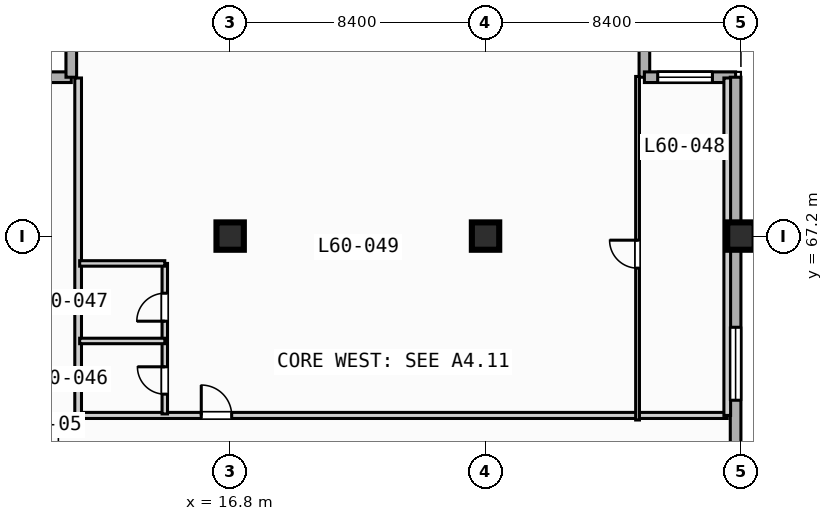
"""IFC4 building model, lengths in metres.
Left out: names, types, materials, properties, quantities, classifications, styles, units other than length and angle.
Written with IfcOpenShell. Run it as: python <this file> out.ifc"""

import sys

from ifc_helpers import new_model, si_unit, direction, frame, frame_2d, origin, origin_2d, place, context, subcontext, project, spatial, rectangle, extrude, element, fill, save


model = new_model("IFC4")
c1 = context("Model", 3, precision=1e-05, world=origin(), true_north=direction((0.0, 1.0)))
c2 = subcontext(c1, "Body", "Model", "MODEL_VIEW")
j1 = project(units=[si_unit("LENGTHUNIT", "METRE"), si_unit("PLANEANGLEUNIT", "RADIAN")], contexts=[c1])
p1 = place(None, origin())
s1 = spatial("IfcSite", under=j1, at=p1, CompositionType="ELEMENT")
p2 = place(p1, origin())
s2 = spatial("IfcBuilding", under=s1, at=p2, CompositionType="ELEMENT")
p3 = place(p2, frame((0.0, 0.0, 245.3)))
s3 = spatial("IfcBuildingStorey", under=s2, at=p3, CompositionType="ELEMENT", Elevation=245.3)
for number, where, z_axis, x_axis in (
    (1, (16.8, 67.2, 0.0), (0.0, 0.0, 1.0), (1.0, 0.0, 0.0)),
    (2, (25.2, 67.2, 0.0), (0.0, 0.0, 1.0), (1.0, 0.0, 0.0)),
    (3, (33.6, 67.2, 0.0), (0.0, 0.0, 1.0), (1.0, 0.0, 0.0)),
):
    element("IfcColumn", number, at=place(p3, frame(where, z_axis=z_axis, x_axis=x_axis)), inside=s3, PredefinedType="COLUMN", context=c2, shape_type="SweptSolid", body=[
        extrude(rectangle(XDim=0.9, YDim=0.9, at=origin_2d()), origin(), (0.0, 0.0, 1.0), 3.7),
    ])
for number, where, z_axis, x_axis in (
    (4, (8.575, 72.425, 0.0), (0.0, 0.0, 1.0), (1.0, 0.0, 0.0)),
    (5, (11.575, 72.425, 0.0), (0.0, 0.0, 1.0), (0.0, 1.0, 0.0)),
    (6, (30.425, 75.425, 0.0), (0.0, 0.0, 1.0), (0.0, -1.0, 0.0)),
):
    element("IfcWall", number, at=place(p3, frame(where, z_axis=z_axis, x_axis=x_axis)), inside=s3, PredefinedType="STANDARD", context=c2, shape_type="SweptSolid", body=[
        extrude(rectangle(XDim=3.0, YDim=0.35, at=frame_2d((1.5, 0.0))), origin(), (0.0, 0.0, 1.0), 3.47),
    ])
p4 = place(p3, frame((30.425, 72.425, 0.0), z_axis=(0.0, 0.0, 1.0), x_axis=(1.0, 0.0, 0.0)))
e7 = element("IfcWall", 7, at=p4, inside=s3, PredefinedType="STANDARD", context=c2, shape_type="SweptSolid", body=[
    extrude(rectangle(XDim=3.0, YDim=0.35, at=frame_2d((1.5, 0.0))), origin(), (0.0, 0.0, 1.0), 3.47),
])
p5 = place(p4, frame((0.438, 0.0, 0.85)))
e8 = element("IfcOpeningElement", 8, at=p5, cuts=e7, PredefinedType="OPENING", context=c2, shape_type="SweptSolid", body=[
    extrude(rectangle(XDim=1.8, YDim=1.8, at=frame_2d((0.9, 0.9))), frame((0.0, 0.185, 0.0), z_axis=(0.0, -1.0, 0.0), x_axis=(1.0, 0.0, 0.0)), (0.0, 0.0, 1.0), 0.37),
])
p6 = place(p3, frame((33.425, 72.425, 0.0), z_axis=(0.0, 0.0, 1.0), x_axis=(0.0, -1.0, 0.0)))
e9 = element("IfcWall", 9, at=p6, inside=s3, PredefinedType="STANDARD", context=c2, shape_type="SweptSolid", body=[
    extrude(rectangle(XDim=39.0, YDim=0.35, at=frame_2d((19.5, 0.0))), origin(), (0.0, 0.0, 1.0), 3.47),
])
p7 = place(p6, frame((33.725, 0.0, 0.85)))
e10 = element("IfcOpeningElement", 10, at=p7, cuts=e9, PredefinedType="OPENING", context=c2, shape_type="SweptSolid", body=[
    extrude(rectangle(XDim=1.8, YDim=1.8, at=frame_2d((0.9, 0.9))), frame((0.0, 0.185, 0.0), z_axis=(0.0, -1.0, 0.0), x_axis=(1.0, 0.0, 0.0)), (0.0, 0.0, 1.0), 0.37),
])
p8 = place(p6, frame((8.225, 0.0, 0.85)))
e11 = element("IfcOpeningElement", 11, at=p8, cuts=e9, PredefinedType="OPENING", context=c2, shape_type="SweptSolid", body=[
    extrude(rectangle(XDim=2.4, YDim=1.95, at=frame_2d((1.2, 0.975))), frame((0.0, 0.185, 0.0), z_axis=(0.0, -1.0, 0.0), x_axis=(1.0, 0.0, 0.0)), (0.0, 0.0, 1.0), 0.37),
])
p9 = place(p3, frame((11.8, 61.3, 0.0), z_axis=(0.0, 0.0, 1.0), x_axis=(1.0, 0.0, 0.0)))
e12 = element("IfcWall", 12, at=p9, inside=s3, PredefinedType="PARTITIONING", context=c2, shape_type="SweptSolid", body=[
    extrude(rectangle(XDim=21.35, YDim=0.2, at=frame_2d((10.675, 0.0))), origin(), (0.0, 0.0, 1.0), 3.47),
])
p10 = place(p9, frame((4.05, 0.0, 0.0)))
e13 = element("IfcOpeningElement", 13, at=p10, cuts=e12, PredefinedType="OPENING", context=c2, shape_type="SweptSolid", body=[
    extrude(rectangle(XDim=1.0, YDim=2.15, at=frame_2d((0.5, 1.075))), frame((0.0, 0.11, 0.0), z_axis=(0.0, -1.0, 0.0), x_axis=(1.0, 0.0, 0.0)), (0.0, 0.0, 1.0), 0.22),
])
for number, where, z_axis, x_axis in (
    (14, (33.15, 61.3, 0.0), (0.0, 0.0, 1.0), (0.0, 1.0, 0.0)),
    (15, (11.8, 61.3, 0.0), (0.0, 0.0, 1.0), (0.0, 1.0, 0.0)),
):
    element("IfcWall", number, at=place(p3, frame(where, z_axis=z_axis, x_axis=x_axis)), inside=s3, PredefinedType="PARTITIONING", context=c2, shape_type="SweptSolid", body=[
        extrude(rectangle(XDim=11.1, YDim=0.22, at=frame_2d((5.55, 0.0))), origin(), (0.0, 0.0, 1.0), 3.47),
    ])
p11 = place(p3, frame((14.65, 61.35, 0.0), z_axis=(0.0, 0.0, 1.0), x_axis=(0.0, 1.0, 0.0)))
e16 = element("IfcWall", 16, at=p11, inside=s3, PredefinedType="PLUMBINGWALL", context=c2, shape_type="SweptSolid", body=[
    extrude(rectangle(XDim=4.95, YDim=0.18, at=frame_2d((2.475, 0.0))), origin(), (0.0, 0.0, 1.0), 3.47),
])
p12 = place(p11, frame((0.65, 0.0, 0.0)))
e17 = element("IfcOpeningElement", 17, at=p12, cuts=e16, PredefinedType="OPENING", context=c2, shape_type="SweptSolid", body=[
    extrude(rectangle(XDim=0.9, YDim=2.1, at=frame_2d((0.45, 1.05))), frame((0.0, 0.1, 0.0), z_axis=(0.0, -1.0, 0.0), x_axis=(1.0, 0.0, 0.0)), (0.0, 0.0, 1.0), 0.2),
])
p13 = place(p11, frame((3.05, 0.0, 0.0)))
e18 = element("IfcOpeningElement", 18, at=p13, cuts=e16, PredefinedType="OPENING", context=c2, shape_type="SweptSolid", body=[
    extrude(rectangle(XDim=0.92, YDim=2.1, at=frame_2d((0.46, 1.05))), frame((0.0, 0.1, 0.0), z_axis=(0.0, -1.0, 0.0), x_axis=(1.0, 0.0, 0.0)), (0.0, 0.0, 1.0), 0.2),
])
for number, where, z_axis, x_axis in (
    (19, (11.85, 63.75, 0.0), (0.0, 0.0, 1.0), (1.0, 0.0, 0.0)),
    (20, (11.85, 66.3, 0.0), (0.0, 0.0, 1.0), (1.0, 0.0, 0.0)),
):
    element("IfcWall", number, at=place(p3, frame(where, z_axis=z_axis, x_axis=x_axis)), inside=s3, PredefinedType="PLUMBINGWALL", context=c2, shape_type="SweptSolid", body=[
        extrude(rectangle(XDim=2.8, YDim=0.18, at=frame_2d((1.4, 0.0))), origin(), (0.0, 0.0, 1.0), 3.47),
    ])
p14 = place(p3, frame((30.2, 61.15, 0.0), z_axis=(0.0, 0.0, 1.0), x_axis=(0.0, 1.0, 0.0)))
e21 = element("IfcWall", 21, at=p14, inside=s3, PredefinedType="PARTITIONING", context=c2, shape_type="SweptSolid", body=[
    extrude(rectangle(XDim=11.3, YDim=0.125, at=frame_2d((5.65, 0.0))), origin(), (0.0, 0.0, 1.0), 3.47),
])
p15 = place(p14, frame((4.995, 0.0, 0.0)))
e22 = element("IfcOpeningElement", 22, at=p15, cuts=e21, PredefinedType="OPENING", context=c2, shape_type="SweptSolid", body=[
    extrude(rectangle(XDim=0.92, YDim=2.1, at=frame_2d((0.46, 1.05))), frame((0.0, 0.073, 0.0), z_axis=(0.0, -1.0, 0.0), x_axis=(1.0, 0.0, 0.0)), (0.0, 0.0, 1.0), 0.145),
])
p16 = place(p5, origin())
e23 = element("IfcWindow", 23, at=p16, inside=s3, PartitioningType="SINGLE_PANEL", PredefinedType="WINDOW", context=c2, shape_type="SweptSolid", body=[
    extrude(rectangle(XDim=1.8, YDim=1.8, at=frame_2d((0.9, 0.9))), frame((0.0, 0.03, 0.0), z_axis=(0.0, -1.0, 0.0), x_axis=(1.0, 0.0, 0.0)), (0.0, 0.0, 1.0), 0.06),
])
fill(e8, e23)
p17 = place(p8, origin())
e24 = element("IfcWindow", 24, at=p17, inside=s3, PartitioningType="SINGLE_PANEL", PredefinedType="WINDOW", context=c2, shape_type="SweptSolid", body=[
    extrude(rectangle(XDim=2.4, YDim=1.95, at=frame_2d((1.2, 0.975))), frame((0.0, 0.03, 0.0), z_axis=(0.0, -1.0, 0.0), x_axis=(1.0, 0.0, 0.0)), (0.0, 0.0, 1.0), 0.06),
])
fill(e11, e24)
p18 = place(p10, origin())
e25 = element("IfcDoor", 25, at=p18, inside=s3, OperationType="SINGLE_SWING_LEFT", PredefinedType="DOOR", context=c2, shape_type="SweptSolid", body=[
    extrude(rectangle(XDim=1.0, YDim=2.15, at=frame_2d((0.5, 1.075))), frame((0.0, 0.025, 0.0), z_axis=(0.0, -1.0, 0.0), x_axis=(1.0, 0.0, 0.0)), (0.0, 0.0, 1.0), 0.05),
])
fill(e13, e25)
p19 = place(p12, origin())
e26 = element("IfcDoor", 26, at=p19, inside=s3, OperationType="SINGLE_SWING_RIGHT", PredefinedType="DOOR", context=c2, shape_type="SweptSolid", body=[
    extrude(rectangle(XDim=0.9, YDim=2.1, at=frame_2d((0.45, 1.05))), frame((0.0, 0.025, 0.0), z_axis=(0.0, -1.0, 0.0), x_axis=(1.0, 0.0, 0.0)), (0.0, 0.0, 1.0), 0.05),
])
fill(e17, e26)
p20 = place(p13, origin())
e27 = element("IfcDoor", 27, at=p20, inside=s3, OperationType="SINGLE_SWING_LEFT", PredefinedType="DOOR", context=c2, shape_type="SweptSolid", body=[
    extrude(rectangle(XDim=0.92, YDim=2.1, at=frame_2d((0.46, 1.05))), frame((0.0, 0.025, 0.0), z_axis=(0.0, -1.0, 0.0), x_axis=(1.0, 0.0, 0.0)), (0.0, 0.0, 1.0), 0.05),
])
fill(e18, e27)
p21 = place(p15, origin())
e28 = element("IfcDoor", 28, at=p21, inside=s3, OperationType="SINGLE_SWING_RIGHT", PredefinedType="DOOR", context=c2, shape_type="SweptSolid", body=[
    extrude(rectangle(XDim=0.92, YDim=2.1, at=frame_2d((0.46, 1.05))), frame((0.0, 0.025, 0.0), z_axis=(0.0, -1.0, 0.0), x_axis=(1.0, 0.0, 0.0)), (0.0, 0.0, 1.0), 0.05),
])
fill(e22, e28)
save(model, sys.argv[1])
